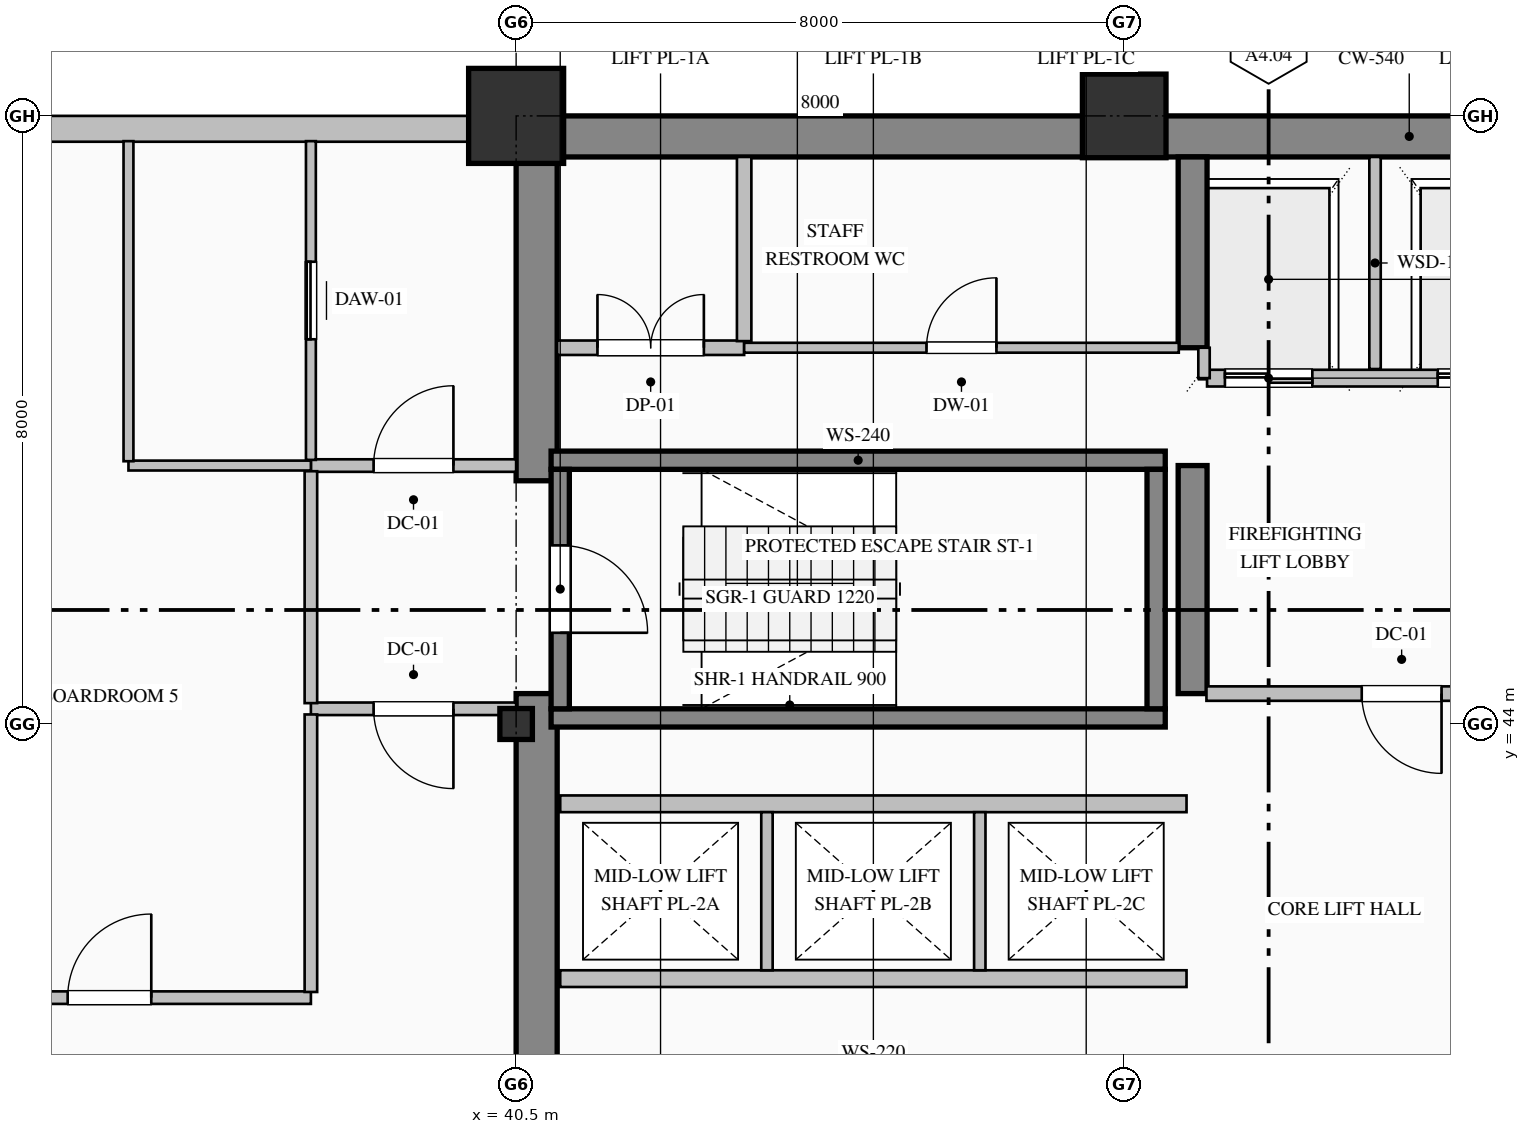
"""IFC4 building model, lengths in metres.
Left out: names, types, materials, properties, quantities, classifications, styles, units other than length and angle.
Written with IfcOpenShell. Run it as: python <this file> out.ifc"""

import sys

from ifc_helpers import new_model, si_unit, direction, frame, frame_2d, origin, origin_2d, place, context, subcontext, project, spatial, rectangle, hollow_rectangle, i_section, extrude, element, fill, save


model = new_model("IFC4")
c1 = context("Model", 3, precision=1e-05, world=origin(), true_north=direction((0.0, 1.0)))
c2 = subcontext(c1, "Body", "Model", "MODEL_VIEW")
j1 = project(units=[si_unit("LENGTHUNIT", "METRE"), si_unit("PLANEANGLEUNIT", "RADIAN")], contexts=[c1])
p1 = place(None, origin())
s1 = spatial("IfcSite", under=j1, at=p1, CompositionType="ELEMENT")
p2 = place(p1, origin())
s2 = spatial("IfcBuilding", under=s1, at=p2, CompositionType="ELEMENT")
p3 = place(p2, frame((0.0, 0.0, 48.2)))
s3 = spatial("IfcBuildingStorey", under=s2, at=p3, CompositionType="ELEMENT", Elevation=48.2)
p4 = place(p3, frame((40.5, 51.73, 0.0), z_axis=(0.0, 0.0, 1.0), x_axis=(1.0, 0.0, 0.0)))
e1 = element("IfcWall", 1, at=p4, inside=s3, PredefinedType="SHEAR", context=c2, shape_type="SweptSolid", body=[
    extrude(rectangle(XDim=23.5, YDim=0.54, at=frame_2d((11.75, 0.0))), origin(), (0.0, 0.0, 1.0), 3.75),
])
p5 = place(p3, frame((40.77, 36.54, 0.0), z_axis=(0.0, 0.0, 1.0), x_axis=(0.0, 1.0, 0.0)))
e2 = element("IfcWall", 2, at=p5, inside=s3, PredefinedType="SHEAR", context=c2, shape_type="SweptSolid", body=[
    extrude(rectangle(XDim=7.86, YDim=0.54, at=frame_2d((3.93, 0.0))), origin(), (0.0, 0.0, 1.0), 3.75),
])
p6 = place(p3, frame((40.77, 47.2, 0.0), z_axis=(0.0, 0.0, 1.0), x_axis=(0.0, 1.0, 0.0)))
e3 = element("IfcWall", 3, at=p6, inside=s3, PredefinedType="SHEAR", context=c2, shape_type="SweptSolid", body=[
    extrude(rectangle(XDim=4.26, YDim=0.54, at=frame_2d((2.13, 0.0))), origin(), (0.0, 0.0, 1.0), 3.75),
])
p7 = place(p3, frame((49.4, 44.4, 0.0), z_axis=(0.0, 0.0, 1.0), x_axis=(0.0, 1.0, 0.0)))
e4 = element("IfcWall", 4, at=p7, inside=s3, PredefinedType="SHEAR", context=c2, shape_type="SweptSolid", body=[
    extrude(rectangle(XDim=3.0, YDim=0.38, at=frame_2d((1.5, 0.0))), origin(), (0.0, 0.0, 1.0), 3.75),
])
p8 = place(p3, frame((49.4, 48.95, 0.0), z_axis=(0.0, 0.0, 1.0), x_axis=(0.0, 1.0, 0.0)))
e5 = element("IfcWall", 5, at=p8, inside=s3, PredefinedType="SHEAR", context=c2, shape_type="SweptSolid", body=[
    extrude(rectangle(XDim=2.51, YDim=0.38, at=frame_2d((1.255, 0.0))), origin(), (0.0, 0.0, 1.0), 3.75),
])
p9 = place(p3, frame((40.5, 44.0, 0.0), z_axis=(0.0, 0.0, 1.0), x_axis=(1.0, 0.0, 0.0)))
e6 = element("IfcColumn", 6, at=p9, inside=s3, PredefinedType="COLUMN", context=c2, shape_type="SweptSolid", body=[
    extrude(i_section(OverallWidth=0.407, OverallDepth=0.428, WebThickness=0.02, FlangeThickness=0.035, FilletRadius=0.022, at=origin_2d()), origin(), (0.0, 0.0, 1.0), 4.0),
])
p10 = place(p3, frame((40.5, 52.0, 0.0), z_axis=(0.0, 0.0, 1.0), x_axis=(1.0, 0.0, 0.0)))
e7 = element("IfcColumn", 7, at=p10, inside=s3, PredefinedType="COLUMN", context=c2, shape_type="SweptSolid", body=[
    extrude(hollow_rectangle(XDim=1.25, YDim=1.25, WallThickness=0.045, at=origin_2d()), origin(), (0.0, 0.0, 1.0), 4.0),
])
p11 = place(p3, frame((48.5, 52.0, 0.0), z_axis=(0.0, 0.0, 1.0), x_axis=(1.0, 0.0, 0.0)))
e8 = element("IfcColumn", 8, at=p11, inside=s3, PredefinedType="COLUMN", context=c2, shape_type="SweptSolid", body=[
    extrude(hollow_rectangle(XDim=1.1, YDim=1.1, WallThickness=0.04, at=origin_2d()), origin(), (0.0, 0.0, 1.0), 4.0),
])
p12 = place(p3, frame((4.0, 51.83, 0.0), z_axis=(0.0, 0.0, 1.0), x_axis=(1.0, 0.0, 0.0)))
e9 = element("IfcWall", 9, at=p12, inside=s3, PredefinedType="SOLIDWALL", context=c2, shape_type="SweptSolid", body=[
    extrude(rectangle(XDim=36.52, YDim=0.34, at=frame_2d((18.26, 0.0))), origin(), (0.0, 0.0, 1.0), 3.25),
])
p13 = place(p12, frame((6.0, 0.0, 0.8)))
e10 = element("IfcOpeningElement", 10, at=p13, cuts=e9, PredefinedType="OPENING", context=c2, shape_type="SweptSolid", body=[
    extrude(rectangle(XDim=2.4, YDim=2.15, at=frame_2d((1.2, 1.075))), frame((0.0, 0.18, 0.0), z_axis=(0.0, -1.0, 0.0), x_axis=(1.0, 0.0, 0.0)), (0.0, 0.0, 1.0), 0.36),
])
p14 = place(p12, frame((16.8, 0.0, 0.8)))
e11 = element("IfcOpeningElement", 11, at=p14, cuts=e9, PredefinedType="OPENING", context=c2, shape_type="SweptSolid", body=[
    extrude(rectangle(XDim=2.4, YDim=2.15, at=frame_2d((1.2, 1.075))), frame((0.0, 0.18, 0.0), z_axis=(0.0, -1.0, 0.0), x_axis=(1.0, 0.0, 0.0)), (0.0, 0.0, 1.0), 0.36),
])
p15 = place(p12, frame((24.15, 0.0, 0.85)))
e12 = element("IfcOpeningElement", 12, at=p15, cuts=e9, PredefinedType="OPENING", context=c2, shape_type="SweptSolid", body=[
    extrude(rectangle(XDim=2.1, YDim=2.05, at=frame_2d((1.05, 1.025))), frame((0.0, 0.18, 0.0), z_axis=(0.0, -1.0, 0.0), x_axis=(1.0, 0.0, 0.0)), (0.0, 0.0, 1.0), 0.36),
])
for number, where, z_axis, x_axis in (
    (13, (40.96, 47.47, 0.0), (0.0, 0.0, 1.0), (1.0, 0.0, 0.0)),
    (14, (49.04, 44.08, 0.0), (0.0, 0.0, 1.0), (-1.0, 0.0, 0.0)),
):
    element("IfcWall", number, at=place(p3, frame(where, z_axis=z_axis, x_axis=x_axis)), inside=s3, PredefinedType="SOLIDWALL", context=c2, shape_type="SweptSolid", body=[
        extrude(rectangle(XDim=8.08, YDim=0.24, at=frame_2d((4.04, 0.0))), origin(), (0.0, 0.0, 1.0), 4.0),
    ])
p16 = place(p3, frame((41.08, 47.35, 0.0), z_axis=(0.0, 0.0, 1.0), x_axis=(0.0, -1.0, 0.0)))
e15 = element("IfcWall", 15, at=p16, inside=s3, PredefinedType="SOLIDWALL", context=c2, shape_type="SweptSolid", body=[
    extrude(rectangle(XDim=3.15, YDim=0.24, at=frame_2d((1.575, 0.0))), origin(), (0.0, 0.0, 1.0), 4.0),
])
p17 = place(p16, frame((1.0, 0.0, 0.0)))
e16 = element("IfcOpeningElement", 16, at=p17, cuts=e15, PredefinedType="OPENING", context=c2, shape_type="SweptSolid", body=[
    extrude(rectangle(XDim=1.15, YDim=2.2, at=frame_2d((0.575, 1.1))), frame((0.0, 0.13, 0.0), z_axis=(0.0, -1.0, 0.0), x_axis=(1.0, 0.0, 0.0)), (0.0, 0.0, 1.0), 0.26),
])
p18 = place(p3, frame((48.92, 44.2, 0.0), z_axis=(0.0, 0.0, 1.0), x_axis=(0.0, 1.0, 0.0)))
e17 = element("IfcWall", 17, at=p18, inside=s3, PredefinedType="SOLIDWALL", context=c2, shape_type="SweptSolid", body=[
    extrude(rectangle(XDim=3.15, YDim=0.24, at=frame_2d((1.575, 0.0))), origin(), (0.0, 0.0, 1.0), 4.0),
])
p19 = place(p3, frame((54.71, 48.55, 0.0), z_axis=(0.0, 0.0, 1.0), x_axis=(-1.0, 0.0, 0.0)))
e18 = element("IfcWall", 18, at=p19, inside=s3, PredefinedType="PARTITIONING", context=c2, shape_type="SweptSolid", body=[
    extrude(rectangle(XDim=5.12, YDim=0.22, at=frame_2d((2.56, 0.0))), origin(), (0.0, 0.0, 1.0), 3.75),
])
p20 = place(p19, frame((3.735, 0.0, 0.0)))
e19 = element("IfcOpeningElement", 19, at=p20, cuts=e18, PredefinedType="OPENING", context=c2, shape_type="SweptSolid", body=[
    extrude(rectangle(XDim=1.15, YDim=2.2, at=frame_2d((0.575, 1.1))), frame((0.0, 0.12, 0.0), z_axis=(0.0, -1.0, 0.0), x_axis=(1.0, 0.0, 0.0)), (0.0, 0.0, 1.0), 0.24),
])
p21 = place(p19, frame((0.935, 0.0, 0.0)))
e20 = element("IfcOpeningElement", 20, at=p21, cuts=e18, PredefinedType="OPENING", context=c2, shape_type="SweptSolid", body=[
    extrude(rectangle(XDim=1.15, YDim=2.2, at=frame_2d((0.575, 1.1))), frame((0.0, 0.12, 0.0), z_axis=(0.0, -1.0, 0.0), x_axis=(1.0, 0.0, 0.0)), (0.0, 0.0, 1.0), 0.24),
])
p22 = place(p3, frame((51.8, 48.67, 0.0), z_axis=(0.0, 0.0, 1.0), x_axis=(0.0, 1.0, 0.0)))
e21 = element("IfcWall", 21, at=p22, inside=s3, PredefinedType="PARTITIONING", context=c2, shape_type="SweptSolid", body=[
    extrude(rectangle(XDim=2.79, YDim=0.15, at=frame_2d((1.395, 0.0))), origin(), (0.0, 0.0, 1.0), 3.75),
])
p23 = place(p3, frame((49.55, 48.55, 0.0), z_axis=(0.0, 0.0, 1.0), x_axis=(0.0, 1.0, 0.0)))
e22 = element("IfcWall", 22, at=p23, inside=s3, PredefinedType="PARTITIONING", context=c2, shape_type="SweptSolid", body=[
    extrude(rectangle(XDim=0.4, YDim=0.15, at=frame_2d((0.2, 0.0))), origin(), (0.0, 0.0, 1.0), 3.75),
])
for number, where, z_axis, x_axis in (
    (23, (49.32, 40.65, 0.0), (0.0, 0.0, 1.0), (-1.0, 0.0, 0.0)),
    (24, (41.08, 42.95, 0.0), (0.0, 0.0, 1.0), (1.0, 0.0, 0.0)),
):
    element("IfcWall", number, at=place(p3, frame(where, z_axis=z_axis, x_axis=x_axis)), inside=s3, PredefinedType="PARTITIONING", context=c2, shape_type="SweptSolid", body=[
        extrude(rectangle(XDim=8.24, YDim=0.22, at=frame_2d((4.12, 0.0))), origin(), (0.0, 0.0, 1.0), 3.75),
    ])
for number, where, z_axis, x_axis in (
    (25, (43.8, 40.76, 0.0), (0.0, 0.0, 1.0), (0.0, 1.0, 0.0)),
    (26, (46.6, 40.76, 0.0), (0.0, 0.0, 1.0), (0.0, 1.0, 0.0)),
):
    element("IfcWall", number, at=place(p3, frame(where, z_axis=z_axis, x_axis=x_axis)), inside=s3, PredefinedType="PARTITIONING", context=c2, shape_type="SweptSolid", body=[
        extrude(rectangle(XDim=2.08, YDim=0.15, at=frame_2d((1.04, 0.0))), origin(), (0.0, 0.0, 1.0), 3.75),
    ])
p24 = place(p3, frame((37.8, 47.4, 0.0), z_axis=(0.0, 0.0, 1.0), x_axis=(1.0, 0.0, 0.0)))
e27 = element("IfcWall", 27, at=p24, inside=s3, PredefinedType="PARTITIONING", context=c2, shape_type="SweptSolid", body=[
    extrude(rectangle(XDim=2.7, YDim=0.165, at=frame_2d((1.35, 0.0))), origin(), (0.0, 0.0, 1.0), 3.75),
])
p25 = place(p24, frame((0.825, 0.0, 0.0)))
e28 = element("IfcOpeningElement", 28, at=p25, cuts=e27, PredefinedType="OPENING", context=c2, shape_type="SweptSolid", body=[
    extrude(rectangle(XDim=1.05, YDim=2.15, at=frame_2d((0.525, 1.075))), frame((0.0, 0.093, 0.0), z_axis=(0.0, -1.0, 0.0), x_axis=(1.0, 0.0, 0.0)), (0.0, 0.0, 1.0), 0.185),
])
p26 = place(p3, frame((40.5, 44.2, 0.0), z_axis=(0.0, 0.0, 1.0), x_axis=(-1.0, 0.0, 0.0)))
e29 = element("IfcWall", 29, at=p26, inside=s3, PredefinedType="PARTITIONING", context=c2, shape_type="SweptSolid", body=[
    extrude(rectangle(XDim=2.7, YDim=0.165, at=frame_2d((1.35, 0.0))), origin(), (0.0, 0.0, 1.0), 3.75),
])
p27 = place(p26, frame((0.825, 0.0, 0.0)))
e30 = element("IfcOpeningElement", 30, at=p27, cuts=e29, PredefinedType="OPENING", context=c2, shape_type="SweptSolid", body=[
    extrude(rectangle(XDim=1.05, YDim=2.15, at=frame_2d((0.525, 1.075))), frame((0.0, 0.093, 0.0), z_axis=(0.0, -1.0, 0.0), x_axis=(1.0, 0.0, 0.0)), (0.0, 0.0, 1.0), 0.185),
])
p28 = place(p3, frame((37.8, 44.274, 0.0), z_axis=(0.0, 0.0, 1.0), x_axis=(0.0, 1.0, 0.0)))
e31 = element("IfcWall", 31, at=p28, inside=s3, PredefinedType="PARTITIONING", context=c2, shape_type="SweptSolid", body=[
    extrude(rectangle(XDim=3.051, YDim=0.165, at=frame_2d((1.525, 0.0))), origin(), (0.0, 0.0, 1.0), 3.75),
])
p29 = place(p3, frame((37.8, 47.475, 0.0), z_axis=(0.0, 0.0, 1.0), x_axis=(0.0, 1.0, 0.0)))
e32 = element("IfcWall", 32, at=p29, inside=s3, PredefinedType="PARTITIONING", context=c2, shape_type="SweptSolid", body=[
    extrude(rectangle(XDim=4.193, YDim=0.13, at=frame_2d((2.097, 0.0))), origin(), (0.0, 0.0, 1.0), 3.75),
])
p30 = place(p29, frame((1.587, 0.0, 0.0)))
e33 = element("IfcOpeningElement", 33, at=p30, cuts=e32, PredefinedType="OPENING", context=c2, shape_type="SweptSolid", body=[
    extrude(rectangle(XDim=1.02, YDim=2.15, at=frame_2d((0.51, 1.075))), frame((0.0, 0.075, 0.0), z_axis=(0.0, -1.0, 0.0), x_axis=(1.0, 0.0, 0.0)), (0.0, 0.0, 1.0), 0.15),
])
p31 = place(p3, frame((37.8, 47.4, 0.0), z_axis=(0.0, 0.0, 1.0), x_axis=(-1.0, 0.0, 0.0)))
e34 = element("IfcWall", 34, at=p31, inside=s3, PredefinedType="PARTITIONING", context=c2, shape_type="SweptSolid", body=[
    extrude(rectangle(XDim=2.4, YDim=0.13, at=frame_2d((1.2, 0.0))), origin(), (0.0, 0.0, 1.0), 3.75),
])
p32 = place(p3, frame((35.4, 47.457, 0.0), z_axis=(0.0, 0.0, 1.0), x_axis=(0.0, 1.0, 0.0)))
e35 = element("IfcWall", 35, at=p32, inside=s3, PredefinedType="PARTITIONING", context=c2, shape_type="SweptSolid", body=[
    extrude(rectangle(XDim=4.211, YDim=0.13, at=frame_2d((2.105, 0.0))), origin(), (0.0, 0.0, 1.0), 3.75),
])
p33 = place(p3, frame((41.04, 48.95, 0.0), z_axis=(0.0, 0.0, 1.0), x_axis=(1.0, 0.0, 0.0)))
e36 = element("IfcWall", 36, at=p33, inside=s3, PredefinedType="PARTITIONING", context=c2, shape_type="SweptSolid", body=[
    extrude(rectangle(XDim=2.46, YDim=0.19, at=frame_2d((1.23, 0.0))), origin(), (0.0, 0.0, 1.0), 3.75),
])
p34 = place(p33, frame((0.53, 0.0, 0.0)))
e37 = element("IfcOpeningElement", 37, at=p34, cuts=e36, PredefinedType="OPENING", context=c2, shape_type="SweptSolid", body=[
    extrude(rectangle(XDim=1.4, YDim=2.25, at=frame_2d((0.7, 1.125))), frame((0.0, 0.105, 0.0), z_axis=(0.0, -1.0, 0.0), x_axis=(1.0, 0.0, 0.0)), (0.0, 0.0, 1.0), 0.21),
])
p35 = place(p3, frame((43.5, 48.95, 0.0), z_axis=(0.0, 0.0, 1.0), x_axis=(1.0, 0.0, 0.0)))
e38 = element("IfcWall", 38, at=p35, inside=s3, PredefinedType="PARTITIONING", context=c2, shape_type="SweptSolid", body=[
    extrude(rectangle(XDim=5.718, YDim=0.13, at=frame_2d((2.859, 0.0))), origin(), (0.0, 0.0, 1.0), 3.75),
])
p36 = place(p35, frame((2.399, 0.0, 0.0)))
e39 = element("IfcOpeningElement", 39, at=p36, cuts=e38, PredefinedType="OPENING", context=c2, shape_type="SweptSolid", body=[
    extrude(rectangle(XDim=0.92, YDim=2.15, at=frame_2d((0.46, 1.075))), frame((0.0, 0.075, 0.0), z_axis=(0.0, -1.0, 0.0), x_axis=(1.0, 0.0, 0.0)), (0.0, 0.0, 1.0), 0.15),
])
p37 = place(p3, frame((54.718, 44.4, 0.0), z_axis=(0.0, 0.0, 1.0), x_axis=(-1.0, 0.0, 0.0)))
e40 = element("IfcWall", 40, at=p37, inside=s3, PredefinedType="PARTITIONING", context=c2, shape_type="SweptSolid", body=[
    extrude(rectangle(XDim=5.136, YDim=0.19, at=frame_2d((2.568, 0.0))), origin(), (0.0, 0.0, 1.0), 3.75),
])
p38 = place(p37, frame((2.043, 0.0, 0.0)))
e41 = element("IfcOpeningElement", 41, at=p38, cuts=e40, PredefinedType="OPENING", context=c2, shape_type="SweptSolid", body=[
    extrude(rectangle(XDim=1.05, YDim=2.15, at=frame_2d((0.525, 1.075))), frame((0.0, 0.105, 0.0), z_axis=(0.0, -1.0, 0.0), x_axis=(1.0, 0.0, 0.0)), (0.0, 0.0, 1.0), 0.21),
])
p39 = place(p3, frame((43.5, 51.46, 0.0), z_axis=(0.0, 0.0, 1.0), x_axis=(0.0, -1.0, 0.0)))
e42 = element("IfcWall", 42, at=p39, inside=s3, PredefinedType="PARTITIONING", context=c2, shape_type="SweptSolid", body=[
    extrude(rectangle(XDim=2.423, YDim=0.19, at=frame_2d((1.211, 0.0))), origin(), (0.0, 0.0, 1.0), 3.75),
])
p40 = place(p3, frame((32.5, 40.4, 0.0), z_axis=(0.0, 0.0, 1.0), x_axis=(1.0, 0.0, 0.0)))
e43 = element("IfcWall", 43, at=p40, inside=s3, PredefinedType="PARTITIONING", context=c2, shape_type="SweptSolid", body=[
    extrude(rectangle(XDim=5.3, YDim=0.165, at=frame_2d((2.65, 0.0))), origin(), (0.0, 0.0, 1.0), 3.75),
])
p41 = place(p40, frame((2.1, 0.0, 0.0)))
e44 = element("IfcOpeningElement", 44, at=p41, cuts=e43, PredefinedType="OPENING", context=c2, shape_type="SweptSolid", body=[
    extrude(rectangle(XDim=1.1, YDim=2.2, at=frame_2d((0.55, 1.1))), frame((0.0, 0.093, 0.0), z_axis=(0.0, -1.0, 0.0), x_axis=(1.0, 0.0, 0.0)), (0.0, 0.0, 1.0), 0.185),
])
p42 = place(p3, frame((37.8, 40.475, 0.0), z_axis=(0.0, 0.0, 1.0), x_axis=(0.0, 1.0, 0.0)))
e45 = element("IfcWall", 45, at=p42, inside=s3, PredefinedType="PARTITIONING", context=c2, shape_type="SweptSolid", body=[
    extrude(rectangle(XDim=3.651, YDim=0.165, at=frame_2d((1.825, 0.0))), origin(), (0.0, 0.0, 1.0), 3.75),
])
p43 = place(p17, origin())
e46 = element("IfcDoor", 46, at=p43, inside=s3, OperationType="SINGLE_SWING_RIGHT", PredefinedType="DOOR", context=c2, shape_type="SweptSolid", body=[
    extrude(rectangle(XDim=1.15, YDim=2.2, at=frame_2d((0.575, 1.1))), frame((0.0, 0.025, 0.0), z_axis=(0.0, -1.0, 0.0), x_axis=(1.0, 0.0, 0.0)), (0.0, 0.0, 1.0), 0.05),
])
fill(e16, e46)
p44 = place(p20, origin())
e47 = element("IfcDoor", 47, at=p44, inside=s3, OperationType="DOUBLE_DOOR_SLIDING", PredefinedType="DOOR", context=c2, shape_type="SweptSolid", body=[
    extrude(rectangle(XDim=1.15, YDim=2.2, at=frame_2d((0.575, 1.1))), frame((0.0, 0.025, 0.0), z_axis=(0.0, -1.0, 0.0), x_axis=(1.0, 0.0, 0.0)), (0.0, 0.0, 1.0), 0.05),
])
fill(e19, e47)
p45 = place(p21, origin())
e48 = element("IfcDoor", 48, at=p45, inside=s3, OperationType="DOUBLE_DOOR_SLIDING", PredefinedType="DOOR", context=c2, shape_type="SweptSolid", body=[
    extrude(rectangle(XDim=1.15, YDim=2.2, at=frame_2d((0.575, 1.1))), frame((0.0, 0.025, 0.0), z_axis=(0.0, -1.0, 0.0), x_axis=(1.0, 0.0, 0.0)), (0.0, 0.0, 1.0), 0.05),
])
fill(e20, e48)
p46 = place(p38, origin())
e49 = element("IfcDoor", 49, at=p46, inside=s3, OperationType="SINGLE_SWING_LEFT", PredefinedType="DOOR", context=c2, shape_type="SweptSolid", body=[
    extrude(rectangle(XDim=1.05, YDim=2.15, at=frame_2d((0.525, 1.075))), frame((0.0, 0.025, 0.0), z_axis=(0.0, -1.0, 0.0), x_axis=(1.0, 0.0, 0.0)), (0.0, 0.0, 1.0), 0.05),
])
fill(e41, e49)
p47 = place(p25, origin())
e50 = element("IfcDoor", 50, at=p47, inside=s3, OperationType="SINGLE_SWING_RIGHT", PredefinedType="DOOR", context=c2, shape_type="SweptSolid", body=[
    extrude(rectangle(XDim=1.05, YDim=2.15, at=frame_2d((0.525, 1.075))), frame((0.0, 0.025, 0.0), z_axis=(0.0, -1.0, 0.0), x_axis=(1.0, 0.0, 0.0)), (0.0, 0.0, 1.0), 0.05),
])
fill(e28, e50)
p48 = place(p27, origin())
e51 = element("IfcDoor", 51, at=p48, inside=s3, OperationType="SINGLE_SWING_LEFT", PredefinedType="DOOR", context=c2, shape_type="SweptSolid", body=[
    extrude(rectangle(XDim=1.05, YDim=2.15, at=frame_2d((0.525, 1.075))), frame((0.0, 0.025, 0.0), z_axis=(0.0, -1.0, 0.0), x_axis=(1.0, 0.0, 0.0)), (0.0, 0.0, 1.0), 0.05),
])
fill(e30, e51)
p49 = place(p30, origin())
e52 = element("IfcDoor", 52, at=p49, inside=s3, OperationType="SLIDING_TO_LEFT", PredefinedType="DOOR", context=c2, shape_type="SweptSolid", body=[
    extrude(rectangle(XDim=1.02, YDim=2.15, at=frame_2d((0.51, 1.075))), frame((0.0, 0.025, 0.0), z_axis=(0.0, -1.0, 0.0), x_axis=(1.0, 0.0, 0.0)), (0.0, 0.0, 1.0), 0.05),
])
fill(e33, e52)
p50 = place(p34, origin())
e53 = element("IfcDoor", 53, at=p50, inside=s3, OperationType="DOUBLE_DOOR_SINGLE_SWING", PredefinedType="DOOR", context=c2, shape_type="SweptSolid", body=[
    extrude(rectangle(XDim=1.4, YDim=2.25, at=frame_2d((0.7, 1.125))), frame((0.0, 0.025, 0.0), z_axis=(0.0, -1.0, 0.0), x_axis=(1.0, 0.0, 0.0)), (0.0, 0.0, 1.0), 0.05),
])
fill(e37, e53)
p51 = place(p36, origin())
e54 = element("IfcDoor", 54, at=p51, inside=s3, OperationType="SINGLE_SWING_RIGHT", PredefinedType="DOOR", context=c2, shape_type="SweptSolid", body=[
    extrude(rectangle(XDim=0.92, YDim=2.15, at=frame_2d((0.46, 1.075))), frame((0.0, 0.025, 0.0), z_axis=(0.0, -1.0, 0.0), x_axis=(1.0, 0.0, 0.0)), (0.0, 0.0, 1.0), 0.05),
])
fill(e39, e54)
p52 = place(p41, origin())
e55 = element("IfcDoor", 55, at=p52, inside=s3, OperationType="SINGLE_SWING_RIGHT", PredefinedType="DOOR", context=c2, shape_type="SweptSolid", body=[
    extrude(rectangle(XDim=1.1, YDim=2.2, at=frame_2d((0.55, 1.1))), frame((0.0, 0.025, 0.0), z_axis=(0.0, -1.0, 0.0), x_axis=(1.0, 0.0, 0.0)), (0.0, 0.0, 1.0), 0.05),
])
fill(e44, e55)
save(model, sys.argv[1])
